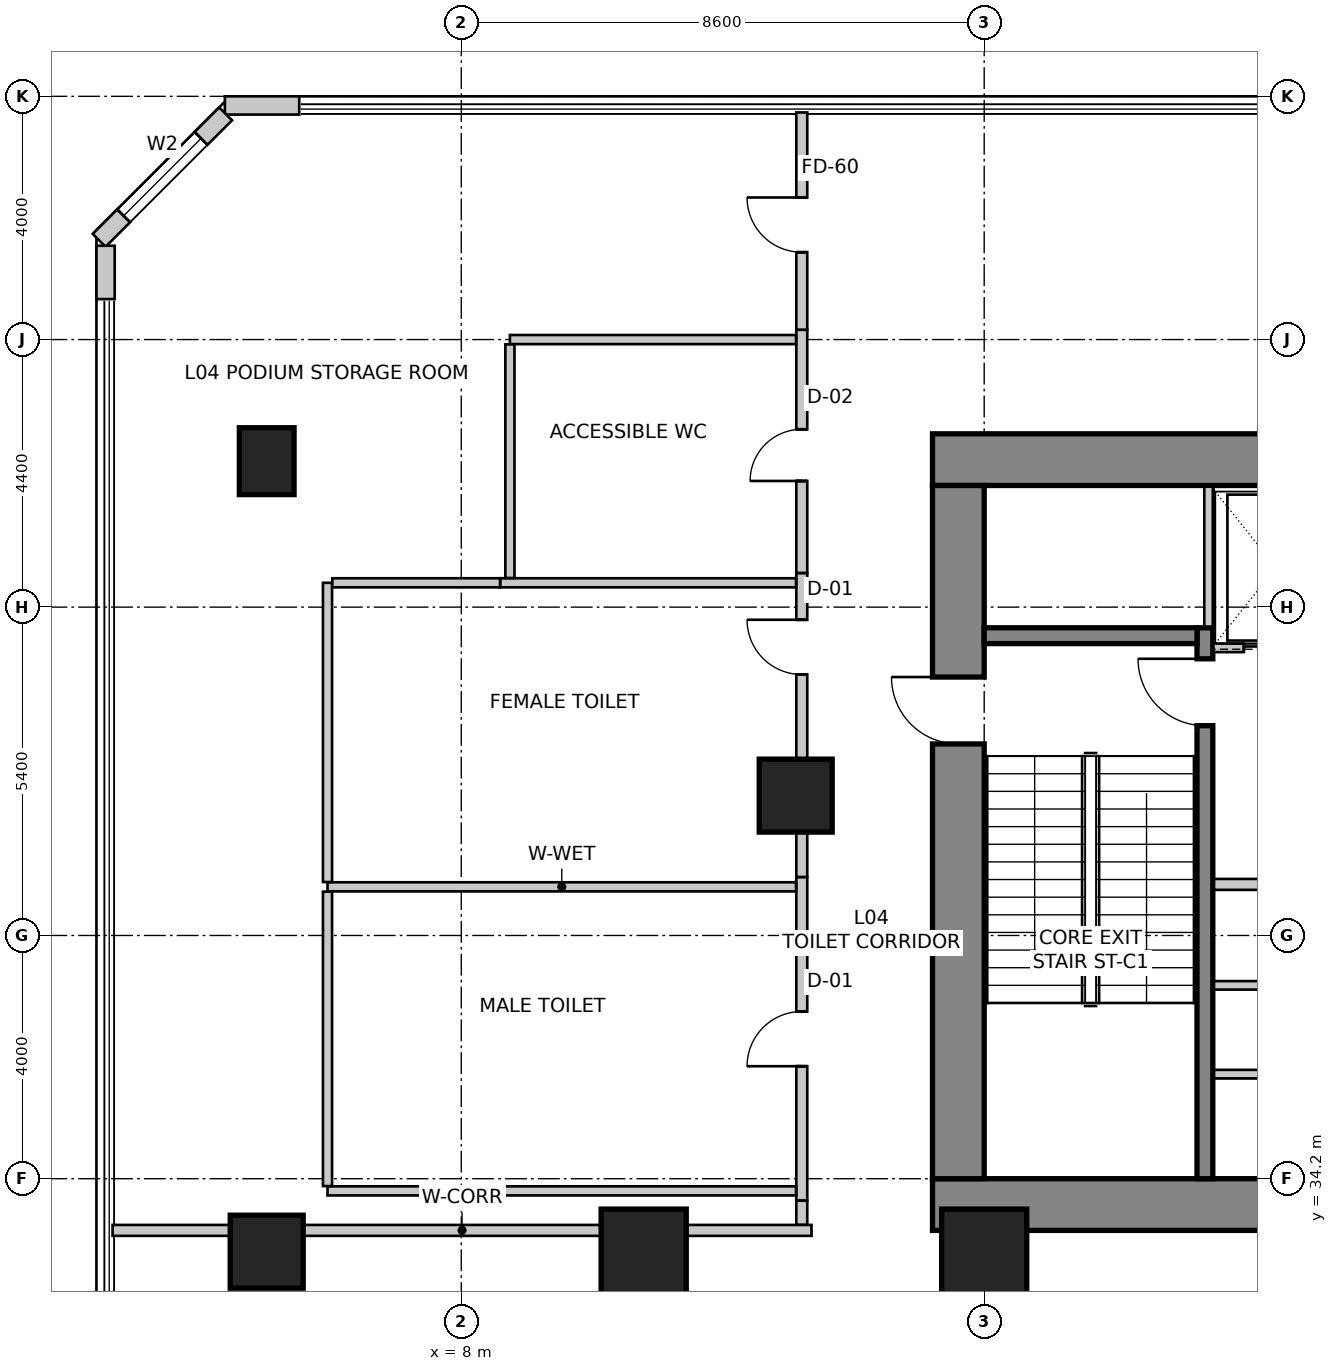
"""IFC4 building model, lengths in metres.
Left out: names, types, materials, properties, quantities, classifications, styles, units other than length and angle.
Written with IfcOpenShell. Run it as: python <this file> out.ifc"""

import sys

from ifc_helpers import new_model, si_unit, direction, frame, frame_2d, origin, origin_2d, place, context, subcontext, project, spatial, rectangle, extrude, source, transform, mapped, element, fill, save


model = new_model("IFC4")
c1 = context("Model", 3, precision=1e-05, world=origin(), true_north=direction((0.0, 1.0)))
c2 = subcontext(c1, "Body", "Model", "MODEL_VIEW")
j1 = project(units=[si_unit("LENGTHUNIT", "METRE"), si_unit("PLANEANGLEUNIT", "RADIAN")], contexts=[c1])
p1 = place(None, origin())
s1 = spatial("IfcSite", under=j1, at=p1, CompositionType="ELEMENT")
p2 = place(p1, origin())
s2 = spatial("IfcBuilding", under=s1, at=p2, CompositionType="ELEMENT")
p3 = place(p2, frame((0.0, 0.0, 16.4)))
s3 = spatial("IfcBuildingStorey", under=s2, at=p3, CompositionType="ELEMENT", Elevation=16.4)
p4 = place(p3, frame((15.75, 46.025, 0.0), z_axis=(0.0, 0.0, 1.0), x_axis=(1.0, 0.0, 0.0)))
e1 = element("IfcWall", 1, at=p4, inside=s3, PredefinedType="SHEAR", context=c2, shape_type="SweptSolid", body=[
    extrude(rectangle(XDim=16.1, YDim=0.85, at=frame_2d((8.05, 0.0))), origin(), (0.0, 0.0, 1.0), 5.2),
])
p5 = place(p3, frame((15.75, 33.775, 0.0), z_axis=(0.0, 0.0, 1.0), x_axis=(1.0, 0.0, 0.0)))
e2 = element("IfcWall", 2, at=p5, inside=s3, PredefinedType="SHEAR", context=c2, shape_type="SweptSolid", body=[
    extrude(rectangle(XDim=16.1, YDim=0.85, at=frame_2d((8.05, 0.0))), origin(), (0.0, 0.0, 1.0), 5.2),
])
m1 = source(origin(), c2, "Body", "SweptSolid", [
    extrude(rectangle(XDim=1.3, YDim=2.15, at=frame_2d((0.65, 1.075))), frame((0.0, 0.435, 0.0), z_axis=(0.0, -1.0, 0.0), x_axis=(1.0, 0.0, 0.0)), (0.0, 0.0, 1.0), 0.87),
])
p6 = place(p5, frame((10.18, 0.0, 0.0)))
e3 = element("IfcOpeningElement", 3, at=p6, cuts=e2, PredefinedType="OPENING", context=c2, shape_type="MappedRepresentation", body=[
    mapped(m1, transform((0.0, 0.0, 0.0), scale=1.0)),
])
p7 = place(p3, frame((16.175, 34.2, 0.0), z_axis=(0.0, 0.0, 1.0), x_axis=(0.0, 1.0, 0.0)))
e4 = element("IfcWall", 4, at=p7, inside=s3, PredefinedType="SHEAR", context=c2, shape_type="SweptSolid", body=[
    extrude(rectangle(XDim=11.4, YDim=0.85, at=frame_2d((5.7, 0.0))), origin(), (0.0, 0.0, 1.0), 5.2),
])
m2 = source(origin(), c2, "Body", "SweptSolid", [
    extrude(rectangle(XDim=1.1, YDim=2.15, at=frame_2d((0.55, 1.075))), frame((0.0, 0.435, 0.0), z_axis=(0.0, -1.0, 0.0), x_axis=(1.0, 0.0, 0.0)), (0.0, 0.0, 1.0), 0.87),
])
p8 = place(p7, frame((7.15, 0.0, 0.0)))
e5 = element("IfcOpeningElement", 5, at=p8, cuts=e4, PredefinedType="OPENING", context=c2, shape_type="MappedRepresentation", body=[
    mapped(m2, transform((0.0, 0.0, 0.0), scale=1.0)),
])
p9 = place(p3, frame((20.23, 34.2, 0.0), z_axis=(0.0, 0.0, 1.0), x_axis=(0.0, 1.0, 0.0)))
e6 = element("IfcWall", 6, at=p9, inside=s3, PredefinedType="SHEAR", context=c2, shape_type="SweptSolid", body=[
    extrude(rectangle(XDim=9.06, YDim=0.26, at=frame_2d((4.53, 0.0))), origin(), (0.0, 0.0, 1.0), 5.2),
])
m3 = source(origin(), c2, "Body", "SweptSolid", [
    extrude(rectangle(XDim=1.1, YDim=2.15, at=frame_2d((0.55, 1.075))), frame((0.0, 0.14, 0.0), z_axis=(0.0, -1.0, 0.0), x_axis=(1.0, 0.0, 0.0)), (0.0, 0.0, 1.0), 0.28),
])
p10 = place(p9, frame((7.45, 0.0, 0.0)))
e7 = element("IfcOpeningElement", 7, at=p10, cuts=e6, PredefinedType="OPENING", context=c2, shape_type="MappedRepresentation", body=[
    mapped(m3, transform((0.0, 0.0, 0.0), scale=1.0)),
])
p11 = place(p3, frame((16.6, 43.13, 0.0), z_axis=(0.0, 0.0, 1.0), x_axis=(1.0, 0.0, 0.0)))
e8 = element("IfcWall", 8, at=p11, inside=s3, PredefinedType="SHEAR", context=c2, shape_type="SweptSolid", body=[
    extrude(rectangle(XDim=3.5, YDim=0.26, at=frame_2d((1.75, 0.0))), origin(), (0.0, 0.0, 1.0), 5.2),
])
m4 = source(origin(), c2, "Body", "SweptSolid", [
    extrude(rectangle(XDim=1.2, YDim=1.2, at=origin_2d()), origin(), (0.0, 0.0, 1.0), 5.2),
])
p12 = place(p3, frame((4.8, 33.0, 0.0), z_axis=(0.0, 0.0, 1.0), x_axis=(1.0, 0.0, 0.0)))
e9 = element("IfcColumn", 9, at=p12, inside=s3, PredefinedType="COLUMN", context=c2, shape_type="MappedRepresentation", body=[
    mapped(m4, transform((0.0, 0.0, 0.0), scale=1.0)),
])
m5 = source(origin(), c2, "Body", "SweptSolid", [
    extrude(rectangle(XDim=1.4, YDim=1.4, at=origin_2d()), origin(), (0.0, 0.0, 1.0), 5.2),
])
for number, where, z_axis, x_axis in (
    (10, (11.0, 33.0, 0.0), (0.0, 0.0, 1.0), (1.0, 0.0, 0.0)),
    (11, (16.6, 33.0, 0.0), (0.0, 0.0, 1.0), (1.0, 0.0, 0.0)),
):
    element("IfcColumn", number, at=place(p3, frame(where, z_axis=z_axis, x_axis=x_axis)), inside=s3, PredefinedType="COLUMN", context=c2, shape_type="MappedRepresentation", body=[
        mapped(m5, transform((0.0, 0.0, 0.0), scale=1.0)),
    ])
m6 = source(origin(), c2, "Body", "SweptSolid", [
    extrude(rectangle(XDim=0.9, YDim=1.1, at=origin_2d()), origin(), (0.0, 0.0, 1.0), 5.2),
])
p13 = place(p3, frame((4.8, 46.0, 0.0), z_axis=(0.0, 0.0, 1.0), x_axis=(1.0, 0.0, 0.0)))
e12 = element("IfcColumn", 12, at=p13, inside=s3, PredefinedType="COLUMN", context=c2, shape_type="MappedRepresentation", body=[
    mapped(m6, transform((0.0, 0.0, 0.0), scale=1.0)),
])
p14 = place(p3, frame((13.5, 40.5, 0.0), z_axis=(0.0, 0.0, 1.0), x_axis=(1.0, 0.0, 0.0)))
e13 = element("IfcColumn", 13, at=p14, inside=s3, PredefinedType="COLUMN", context=c2, shape_type="MappedRepresentation", body=[
    mapped(m4, transform((0.0, 0.0, 0.0), scale=1.0)),
])
p15 = place(p3, frame((5.335, 51.85, 0.0), z_axis=(0.0, 0.0, 1.0), x_axis=(-1.0, 0.0, 0.0)))
e14 = element("IfcWall", 14, at=p15, inside=s3, PredefinedType="SOLIDWALL", context=c2, shape_type="SweptSolid", body=[
    extrude(rectangle(XDim=1.223, YDim=0.3, at=frame_2d((0.611, 0.0))), origin(), (0.0, 0.0, 1.0), 4.85),
])
p16 = place(p3, frame((4.124, 51.712, 0.0), z_axis=(0.0, 0.0, 1.0), x_axis=(-0.707106781187, -0.707106781187, 0.0)))
e15 = element("IfcWall", 15, at=p16, inside=s3, PredefinedType="SOLIDWALL", context=c2, shape_type="SweptSolid", body=[
    extrude(rectangle(XDim=2.942, YDim=0.3, at=frame_2d((1.471, 0.0))), origin(), (0.0, 0.0, 1.0), 4.85),
])
m7 = source(origin(), c2, "Body", "SweptSolid", [
    extrude(rectangle(XDim=1.8, YDim=2.1, at=frame_2d((0.9, 1.05))), frame((0.0, 0.16, 0.0), z_axis=(0.0, -1.0, 0.0), x_axis=(1.0, 0.0, 0.0)), (0.0, 0.0, 1.0), 0.32),
])
p17 = place(p16, frame((0.571, 0.0, 0.85)))
e16 = element("IfcOpeningElement", 16, at=p17, cuts=e15, PredefinedType="OPENING", context=c2, shape_type="MappedRepresentation", body=[
    mapped(m7, transform((0.0, 0.0, 0.0), scale=1.0)),
])
p18 = place(p3, frame((2.15, 49.543, 0.0), z_axis=(0.0, 0.0, 1.0), x_axis=(0.0, -1.0, 0.0)))
e17 = element("IfcWall", 17, at=p18, inside=s3, PredefinedType="SOLIDWALL", context=c2, shape_type="SweptSolid", body=[
    extrude(rectangle(XDim=0.877, YDim=0.3, at=frame_2d((0.439, 0.0))), origin(), (0.0, 0.0, 1.0), 4.85),
])
p19 = place(p3, frame((20.37, 42.93, 0.0), z_axis=(0.0, 0.0, 1.0), x_axis=(1.0, 0.0, 0.0)))
e18 = element("IfcWall", 18, at=p19, inside=s3, PredefinedType="SOLIDWALL", context=c2, shape_type="SweptSolid", body=[
    extrude(rectangle(XDim=6.86, YDim=0.14, at=frame_2d((3.43, 0.0))), origin(), (0.0, 0.0, 1.0), 4.85),
])
m8 = source(origin(), c2, "Body", "SweptSolid", [
    extrude(rectangle(XDim=1.1, YDim=2.15, at=frame_2d((0.55, 1.075))), frame((0.0, 0.08, 0.0), z_axis=(0.0, -1.0, 0.0), x_axis=(1.0, 0.0, 0.0)), (0.0, 0.0, 1.0), 0.16),
])
p20 = place(p19, frame((0.5, 0.0, 0.0)))
e19 = element("IfcOpeningElement", 19, at=p20, cuts=e18, PredefinedType="OPENING", context=c2, shape_type="MappedRepresentation", body=[
    mapped(m8, transform((0.0, 0.0, 0.0), scale=1.0)),
])
p21 = place(p19, frame((2.7, 0.0, 0.0)))
e20 = element("IfcOpeningElement", 20, at=p21, cuts=e18, PredefinedType="OPENING", context=c2, shape_type="MappedRepresentation", body=[
    mapped(m8, transform((0.0, 0.0, 0.0), scale=1.0)),
])
p22 = place(p19, frame((5.1, 0.0, 0.0)))
e21 = element("IfcOpeningElement", 21, at=p22, cuts=e18, PredefinedType="OPENING", context=c2, shape_type="MappedRepresentation", body=[
    mapped(m8, transform((0.0, 0.0, 0.0), scale=1.0)),
])
p23 = place(p3, frame((20.29, 43.28, 0.0), z_axis=(0.0, 0.0, 1.0), x_axis=(0.0, 1.0, 0.0)))
e22 = element("IfcWall", 22, at=p23, inside=s3, PredefinedType="SOLIDWALL", context=c2, shape_type="SweptSolid", body=[
    extrude(rectangle(XDim=2.3, YDim=0.14, at=frame_2d((1.15, 0.0))), origin(), (0.0, 0.0, 1.0), 4.85),
])
p24 = place(p3, frame((20.38, 35.92, 0.0), z_axis=(0.0, 0.0, 1.0), x_axis=(1.0, 0.0, 0.0)))
e23 = element("IfcWall", 23, at=p24, inside=s3, PredefinedType="SOLIDWALL", context=c2, shape_type="SweptSolid", body=[
    extrude(rectangle(XDim=5.65, YDim=0.14, at=frame_2d((2.825, 0.0))), origin(), (0.0, 0.0, 1.0), 4.85),
])
p25 = place(p3, frame((20.38, 37.38, 0.0), z_axis=(0.0, 0.0, 1.0), x_axis=(1.0, 0.0, 0.0)))
e24 = element("IfcWall", 24, at=p25, inside=s3, PredefinedType="SOLIDWALL", context=c2, shape_type="SweptSolid", body=[
    extrude(rectangle(XDim=5.75, YDim=0.14, at=frame_2d((2.875, 0.0))), origin(), (0.0, 0.0, 1.0), 4.85),
])
p26 = place(p3, frame((20.38, 39.04, 0.0), z_axis=(0.0, 0.0, 1.0), x_axis=(1.0, 0.0, 0.0)))
e25 = element("IfcWall", 25, at=p26, inside=s3, PredefinedType="SOLIDWALL", context=c2, shape_type="SweptSolid", body=[
    extrude(rectangle(XDim=5.75, YDim=0.18, at=frame_2d((2.875, 0.0))), origin(), (0.0, 0.0, 1.0), 4.85),
])
p27 = place(p3, frame((2.265, 33.35, 0.0), z_axis=(0.0, 0.0, 1.0), x_axis=(1.0, 0.0, 0.0)))
e26 = element("IfcWall", 26, at=p27, inside=s3, PredefinedType="PARTITIONING", context=c2, shape_type="SweptSolid", body=[
    extrude(rectangle(XDim=11.495, YDim=0.18, at=frame_2d((5.748, 0.0))), origin(), (0.0, 0.0, 1.0), 3.642),
])
p28 = place(p3, frame((13.6, 33.84, 0.0), z_axis=(0.0, 0.0, 1.0), x_axis=(0.0, 1.0, 0.0)))
e27 = element("IfcWall", 27, at=p28, inside=s3, PredefinedType="PARTITIONING", context=c2, shape_type="SweptSolid", body=[
    extrude(rectangle(XDim=5.32, YDim=0.18, at=frame_2d((2.66, 0.0))), origin(), (0.0, 0.0, 1.0), 4.85),
])
m9 = source(origin(), c2, "Body", "SweptSolid", [
    extrude(rectangle(XDim=0.9, YDim=2.15, at=frame_2d((0.45, 1.075))), frame((0.0, 0.1, 0.0), z_axis=(0.0, -1.0, 0.0), x_axis=(1.0, 0.0, 0.0)), (0.0, 0.0, 1.0), 0.2),
])
p29 = place(p28, frame((2.21, 0.0, 0.0)))
e28 = element("IfcOpeningElement", 28, at=p29, cuts=e27, PredefinedType="OPENING", context=c2, shape_type="MappedRepresentation", body=[
    mapped(m9, transform((0.0, 0.0, 0.0), scale=1.0)),
])
p30 = place(p3, frame((13.6, 39.162, 0.0), z_axis=(0.0, 0.0, 1.0), x_axis=(0.0, 1.0, 0.0)))
e29 = element("IfcWall", 29, at=p30, inside=s3, PredefinedType="PARTITIONING", context=c2, shape_type="SweptSolid", body=[
    extrude(rectangle(XDim=4.998, YDim=0.18, at=frame_2d((2.499, 0.0))), origin(), (0.0, 0.0, 1.0), 3.892),
])
p31 = place(p30, frame((3.33, 0.0, 0.0)))
e30 = element("IfcOpeningElement", 30, at=p31, cuts=e29, PredefinedType="OPENING", context=c2, shape_type="MappedRepresentation", body=[
    mapped(m9, transform((0.0, 0.0, 0.0), scale=1.0)),
])
p32 = place(p3, frame((13.6, 44.162, 0.0), z_axis=(0.0, 0.0, 1.0), x_axis=(0.0, 1.0, 0.0)))
e31 = element("IfcWall", 31, at=p32, inside=s3, PredefinedType="PARTITIONING", context=c2, shape_type="SweptSolid", body=[
    extrude(rectangle(XDim=3.998, YDim=0.18, at=frame_2d((1.999, 0.0))), origin(), (0.0, 0.0, 1.0), 4.85),
])
m10 = source(origin(), c2, "Body", "SweptSolid", [
    extrude(rectangle(XDim=0.85, YDim=2.15, at=frame_2d((0.425, 1.075))), frame((0.0, 0.1, 0.0), z_axis=(0.0, -1.0, 0.0), x_axis=(1.0, 0.0, 0.0)), (0.0, 0.0, 1.0), 0.2),
])
p33 = place(p32, frame((1.512, 0.0, 0.0)))
e32 = element("IfcOpeningElement", 32, at=p33, cuts=e31, PredefinedType="OPENING", context=c2, shape_type="MappedRepresentation", body=[
    mapped(m10, transform((0.0, 0.0, 0.0), scale=1.0)),
])
p34 = place(p3, frame((13.6, 48.162, 0.0), z_axis=(0.0, 0.0, 1.0), x_axis=(0.0, 1.0, 0.0)))
e33 = element("IfcWall", 33, at=p34, inside=s3, PredefinedType="PARTITIONING", context=c2, shape_type="SweptSolid", body=[
    extrude(rectangle(XDim=3.573, YDim=0.18, at=frame_2d((1.787, 0.0))), origin(), (0.0, 0.0, 1.0), 4.85),
])
p35 = place(p34, frame((1.274, 0.0, 0.0)))
e34 = element("IfcOpeningElement", 34, at=p35, cuts=e33, PredefinedType="OPENING", context=c2, shape_type="MappedRepresentation", body=[
    mapped(m9, transform((0.0, 0.0, 0.0), scale=1.0)),
])
p36 = place(p3, frame((13.6, 33.444, 0.0), z_axis=(0.0, 0.0, 1.0), x_axis=(0.0, 1.0, 0.0)))
e35 = element("IfcWall", 35, at=p36, inside=s3, PredefinedType="PARTITIONING", context=c2, shape_type="SweptSolid", body=[
    extrude(rectangle(XDim=0.394, YDim=0.18, at=frame_2d((0.197, 0.0))), origin(), (0.0, 0.0, 1.0), 4.85),
])
for number, where, z_axis, x_axis in (
    (36, (5.8, 39.0, 0.0), (0.0, 0.0, 1.0), (1.0, 0.0, 0.0)),
    (37, (13.506, 34.0, 0.0), (0.0, 0.0, 1.0), (-1.0, 0.0, 0.0)),
):
    element("IfcWall", number, at=place(p3, frame(where, z_axis=z_axis, x_axis=x_axis)), inside=s3, PredefinedType="PARTITIONING", context=c2, shape_type="SweptSolid", body=[
        extrude(rectangle(XDim=7.706, YDim=0.15, at=frame_2d((3.853, 0.0))), origin(), (0.0, 0.0, 1.0), 3.892),
    ])
p37 = place(p3, frame((5.8, 34.079, 0.0), z_axis=(0.0, 0.0, 1.0), x_axis=(0.0, 1.0, 0.0)))
e38 = element("IfcWall", 38, at=p37, inside=s3, PredefinedType="PARTITIONING", context=c2, shape_type="SweptSolid", body=[
    extrude(rectangle(XDim=4.842, YDim=0.15, at=frame_2d((2.421, 0.0))), origin(), (0.0, 0.0, 1.0), 4.85),
])
p38 = place(p3, frame((8.64, 44.0, 0.0), z_axis=(0.0, 0.0, 1.0), x_axis=(1.0, 0.0, 0.0)))
e39 = element("IfcWall", 39, at=p38, inside=s3, PredefinedType="PARTITIONING", context=c2, shape_type="SweptSolid", body=[
    extrude(rectangle(XDim=4.866, YDim=0.15, at=frame_2d((2.433, 0.0))), origin(), (0.0, 0.0, 1.0), 4.85),
])
p39 = place(p3, frame((5.8, 39.079, 0.0), z_axis=(0.0, 0.0, 1.0), x_axis=(0.0, 1.0, 0.0)))
e40 = element("IfcWall", 40, at=p39, inside=s3, PredefinedType="PARTITIONING", context=c2, shape_type="SweptSolid", body=[
    extrude(rectangle(XDim=4.921, YDim=0.15, at=frame_2d((2.46, 0.0))), origin(), (0.0, 0.0, 1.0), 4.85),
])
p40 = place(p3, frame((5.879, 44.0, 0.0), z_axis=(0.0, 0.0, 1.0), x_axis=(1.0, 0.0, 0.0)))
e41 = element("IfcWall", 41, at=p40, inside=s3, PredefinedType="PARTITIONING", context=c2, shape_type="SweptSolid", body=[
    extrude(rectangle(XDim=2.759, YDim=0.15, at=frame_2d((1.379, 0.0))), origin(), (0.0, 0.0, 1.0), 3.892),
])
p41 = place(p3, frame((8.8, 48.0, 0.0), z_axis=(0.0, 0.0, 1.0), x_axis=(1.0, 0.0, 0.0)))
e42 = element("IfcWall", 42, at=p41, inside=s3, PredefinedType="PARTITIONING", context=c2, shape_type="SweptSolid", body=[
    extrude(rectangle(XDim=4.706, YDim=0.15, at=frame_2d((2.353, 0.0))), origin(), (0.0, 0.0, 1.0), 4.85),
])
p42 = place(p3, frame((8.8, 44.079, 0.0), z_axis=(0.0, 0.0, 1.0), x_axis=(0.0, 1.0, 0.0)))
e43 = element("IfcWall", 43, at=p42, inside=s3, PredefinedType="PARTITIONING", context=c2, shape_type="SweptSolid", body=[
    extrude(rectangle(XDim=3.842, YDim=0.15, at=frame_2d((1.921, 0.0))), origin(), (0.0, 0.0, 1.0), 4.85),
])
m11 = source(origin(), c2, "Body", "SweptSolid", [
    extrude(rectangle(XDim=1.8, YDim=2.1, at=frame_2d((0.9, 1.05))), frame((0.0, -0.015, 0.0), z_axis=(0.0, -1.0, 0.0), x_axis=(1.0, 0.0, 0.0)), (0.0, 0.0, 1.0), 0.06),
])
p43 = place(p17, origin())
e44 = element("IfcWindow", 44, at=p43, inside=s3, PartitioningType="SINGLE_PANEL", PredefinedType="WINDOW", context=c2, shape_type="MappedRepresentation", body=[
    mapped(m11, transform((0.0, 0.0, 0.0), scale=1.0)),
])
fill(e16, e44)
m12 = source(origin(), c2, "Body", "SweptSolid", [
    extrude(rectangle(XDim=1.1, YDim=2.15, at=frame_2d((0.55, 1.075))), frame((0.0, 0.025, 0.0), z_axis=(0.0, -1.0, 0.0), x_axis=(1.0, 0.0, 0.0)), (0.0, 0.0, 1.0), 0.05),
])
p44 = place(p20, origin())
e45 = element("IfcDoor", 45, at=p44, inside=s3, OperationType="SLIDING_TO_LEFT", PredefinedType="DOOR", context=c2, shape_type="MappedRepresentation", body=[
    mapped(m12, transform((0.0, 0.0, 0.0), scale=1.0)),
])
fill(e19, e45)
m13 = source(origin(), c2, "Body", "SweptSolid", [
    extrude(rectangle(XDim=1.1, YDim=2.15, at=frame_2d((0.55, 1.075))), frame((0.0, 0.025, 0.0), z_axis=(0.0, -1.0, 0.0), x_axis=(1.0, 0.0, 0.0)), (0.0, 0.0, 1.0), 0.05),
])
p45 = place(p10, origin())
e46 = element("IfcDoor", 46, at=p45, inside=s3, OperationType="SINGLE_SWING_RIGHT", PredefinedType="DOOR", context=c2, shape_type="MappedRepresentation", body=[
    mapped(m13, transform((0.0, 0.0, 0.0), scale=1.0)),
])
fill(e7, e46)
p46 = place(p8, origin())
e47 = element("IfcDoor", 47, at=p46, inside=s3, OperationType="SINGLE_SWING_RIGHT", PredefinedType="DOOR", context=c2, shape_type="MappedRepresentation", body=[
    mapped(m13, transform((0.0, 0.0, 0.0), scale=1.0)),
])
fill(e5, e47)
m14 = source(origin(), c2, "Body", "SweptSolid", [
    extrude(rectangle(XDim=0.9, YDim=2.15, at=frame_2d((0.45, 1.075))), frame((0.0, 0.025, 0.0), z_axis=(0.0, -1.0, 0.0), x_axis=(1.0, 0.0, 0.0)), (0.0, 0.0, 1.0), 0.05),
])
p47 = place(p29, origin())
e48 = element("IfcDoor", 48, at=p47, inside=s3, OperationType="SINGLE_SWING_LEFT", PredefinedType="DOOR", context=c2, shape_type="MappedRepresentation", body=[
    mapped(m14, transform((0.0, 0.0, 0.0), scale=1.0)),
])
fill(e28, e48)
p48 = place(p31, origin())
e49 = element("IfcDoor", 49, at=p48, inside=s3, OperationType="SINGLE_SWING_RIGHT", PredefinedType="DOOR", context=c2, shape_type="MappedRepresentation", body=[
    mapped(m14, transform((0.0, 0.0, 0.0), scale=1.0)),
])
fill(e30, e49)
m15 = source(origin(), c2, "Body", "SweptSolid", [
    extrude(rectangle(XDim=0.85, YDim=2.15, at=frame_2d((0.425, 1.075))), frame((0.0, 0.025, 0.0), z_axis=(0.0, -1.0, 0.0), x_axis=(1.0, 0.0, 0.0)), (0.0, 0.0, 1.0), 0.05),
])
p49 = place(p33, origin())
e50 = element("IfcDoor", 50, at=p49, inside=s3, OperationType="SINGLE_SWING_LEFT", PredefinedType="DOOR", context=c2, shape_type="MappedRepresentation", body=[
    mapped(m15, transform((0.0, 0.0, 0.0), scale=1.0)),
])
fill(e32, e50)
m16 = source(origin(), c2, "Body", "SweptSolid", [
    extrude(rectangle(XDim=0.9, YDim=2.15, at=frame_2d((0.45, 1.075))), frame((0.0, 0.025, 0.0), z_axis=(0.0, -1.0, 0.0), x_axis=(1.0, 0.0, 0.0)), (0.0, 0.0, 1.0), 0.05),
])
p50 = place(p35, origin())
e51 = element("IfcDoor", 51, at=p50, inside=s3, OperationType="SINGLE_SWING_RIGHT", PredefinedType="DOOR", context=c2, shape_type="MappedRepresentation", body=[
    mapped(m16, transform((0.0, 0.0, 0.0), scale=1.0)),
])
fill(e34, e51)
save(model, sys.argv[1])
